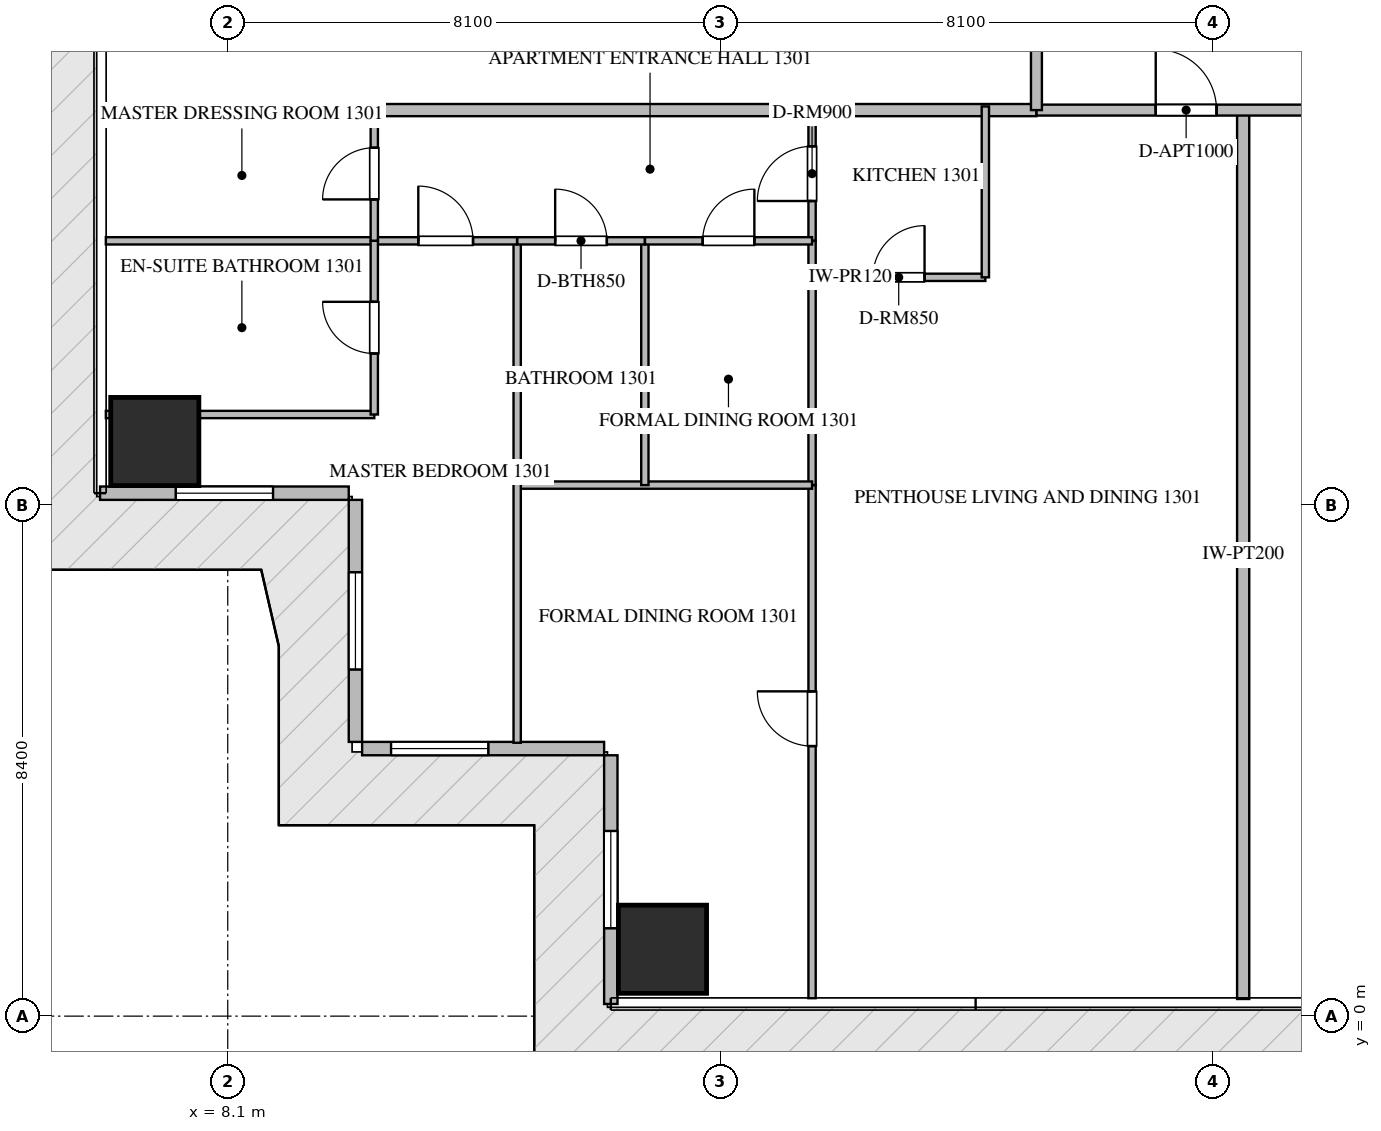
"""IFC4 building model, lengths in metres.
Left out: names, types, materials, properties, quantities, classifications, styles, units other than length and angle.
Written with IfcOpenShell. Run it as: python <this file> out.ifc"""

import sys

from ifc_helpers import new_model, si_unit, direction, frame, frame_2d, origin, origin_2d, place, context, subcontext, project, spatial, rectangle, extrude, source, transform, mapped, element, fill, save


model = new_model("IFC4")
c1 = context("Model", 3, precision=1e-05, world=origin(), true_north=direction((0.0, 1.0)))
c2 = subcontext(c1, "Body", "Model", "MODEL_VIEW")
j1 = project(units=[si_unit("LENGTHUNIT", "METRE"), si_unit("PLANEANGLEUNIT", "RADIAN")], contexts=[c1])
p1 = place(None, origin())
s1 = spatial("IfcSite", under=j1, at=p1, CompositionType="ELEMENT")
p2 = place(p1, origin())
s2 = spatial("IfcBuilding", under=s1, at=p2, CompositionType="ELEMENT")
p3 = place(p2, frame((0.0, 0.0, 56.7)))
s3 = spatial("IfcBuildingStorey", under=s2, at=p3, CompositionType="ELEMENT", Elevation=56.7)
m1 = source(origin(), c2, "Body", "SweptSolid", [
    extrude(rectangle(XDim=1.45, YDim=1.45, at=origin_2d()), origin(), (0.0, 0.0, 1.0), 3.75),
])
for number, where, z_axis, x_axis in (
    (1, (15.25, 1.1, -0.26), (0.0, 0.0, 1.0), (1.0, 0.0, 0.0)),
    (2, (6.9, 9.45, -0.26), (0.0, 0.0, 1.0), (1.0, 0.0, 0.0)),
):
    element("IfcColumn", number, at=place(p3, frame(where, z_axis=z_axis, x_axis=x_axis)), inside=s3, PredefinedType="COLUMN", context=c2, shape_type="MappedRepresentation", body=[
        mapped(m1, transform((0.0, 0.0, 0.0), scale=1.0)),
    ])
p4 = place(p3, frame((6.0, 8.6, 0.0), z_axis=(0.0, 0.0, 1.0), x_axis=(1.0, 0.0, 0.0)))
e3 = element("IfcWall", 3, at=p4, inside=s3, PredefinedType="ELEMENTEDWALL", context=c2, shape_type="SweptSolid", body=[
    extrude(rectangle(XDim=4.09, YDim=0.22, at=frame_2d((2.045, 0.0))), origin(), (0.0, 0.0, 1.0), 3.475),
])
p5 = place(p4, frame((1.245, 0.0, 0.65)))
e4 = element("IfcOpeningElement", 4, at=p5, cuts=e3, PredefinedType="OPENING", context=c2, shape_type="SweptSolid", body=[
    extrude(rectangle(XDim=1.6, YDim=2.1, at=frame_2d((0.8, 1.05))), frame((0.0, 0.12, 0.0), z_axis=(0.0, -1.0, 0.0), x_axis=(1.0, 0.0, 0.0)), (0.0, 0.0, 1.0), 0.24),
])
p6 = place(p3, frame((10.2, 8.49, 0.0), z_axis=(0.0, 0.0, 1.0), x_axis=(0.0, -1.0, 0.0)))
e5 = element("IfcWall", 5, at=p6, inside=s3, PredefinedType="ELEMENTEDWALL", context=c2, shape_type="SweptSolid", body=[
    extrude(rectangle(XDim=3.98, YDim=0.22, at=frame_2d((1.99, 0.0))), origin(), (0.0, 0.0, 1.0), 3.475),
])
p7 = place(p6, frame((1.19, 0.0, 0.65)))
e6 = element("IfcOpeningElement", 6, at=p7, cuts=e5, PredefinedType="OPENING", context=c2, shape_type="SweptSolid", body=[
    extrude(rectangle(XDim=1.6, YDim=2.1, at=frame_2d((0.8, 1.05))), frame((0.0, 0.12, 0.0), z_axis=(0.0, -1.0, 0.0), x_axis=(1.0, 0.0, 0.0)), (0.0, 0.0, 1.0), 0.24),
])
p8 = place(p3, frame((10.31, 4.4, 0.0), z_axis=(0.0, 0.0, 1.0), x_axis=(1.0, 0.0, 0.0)))
e7 = element("IfcWall", 7, at=p8, inside=s3, PredefinedType="ELEMENTEDWALL", context=c2, shape_type="SweptSolid", body=[
    extrude(rectangle(XDim=3.98, YDim=0.22, at=frame_2d((1.99, 0.0))), origin(), (0.0, 0.0, 1.0), 3.475),
])
p9 = place(p8, frame((0.476, 0.0, 0.65)))
e8 = element("IfcOpeningElement", 8, at=p9, cuts=e7, PredefinedType="OPENING", context=c2, shape_type="SweptSolid", body=[
    extrude(rectangle(XDim=1.6, YDim=2.1, at=frame_2d((0.8, 1.05))), frame((0.0, 0.12, 0.0), z_axis=(0.0, -1.0, 0.0), x_axis=(1.0, 0.0, 0.0)), (0.0, 0.0, 1.0), 0.24),
])
p10 = place(p3, frame((14.4, 4.29, 0.0), z_axis=(0.0, 0.0, 1.0), x_axis=(0.0, -1.0, 0.0)))
e9 = element("IfcWall", 9, at=p10, inside=s3, PredefinedType="ELEMENTEDWALL", context=c2, shape_type="SweptSolid", body=[
    extrude(rectangle(XDim=4.09, YDim=0.22, at=frame_2d((2.045, 0.0))), origin(), (0.0, 0.0, 1.0), 3.475),
])
p11 = place(p10, frame((1.245, 0.0, 0.65)))
e10 = element("IfcOpeningElement", 10, at=p11, cuts=e9, PredefinedType="OPENING", context=c2, shape_type="SweptSolid", body=[
    extrude(rectangle(XDim=1.6, YDim=2.1, at=frame_2d((0.8, 1.05))), frame((0.0, 0.12, 0.0), z_axis=(0.0, -1.0, 0.0), x_axis=(1.0, 0.0, 0.0)), (0.0, 0.0, 1.0), 0.24),
])
p12 = place(p3, frame((24.8, 0.282, 0.0), z_axis=(0.0, 0.0, 1.0), x_axis=(0.0, 1.0, 0.0)))
e11 = element("IfcWall", 11, at=p12, inside=s3, PredefinedType="PARTITIONING", context=c2, shape_type="SweptSolid", body=[
    extrude(rectangle(XDim=14.618, YDim=0.2, at=frame_2d((7.309, 0.0))), origin(), (0.0, 0.0, 1.0), 3.49),
])
p13 = place(p3, frame((6.082, 14.9, 0.0), z_axis=(0.0, 0.0, 1.0), x_axis=(1.0, 0.0, 0.0)))
e12 = element("IfcWall", 12, at=p13, inside=s3, PredefinedType="PARTITIONING", context=c2, shape_type="SweptSolid", body=[
    extrude(rectangle(XDim=15.318, YDim=0.2, at=frame_2d((7.659, 0.0))), origin(), (0.0, 0.0, 1.0), 3.49),
])
p14 = place(p3, frame((21.402, 14.9, 0.0), z_axis=(0.0, 0.0, 1.0), x_axis=(1.0, 0.0, 0.0)))
e13 = element("IfcWall", 13, at=p14, inside=s3, PredefinedType="PARTITIONING", context=c2, shape_type="SweptSolid", body=[
    extrude(rectangle(XDim=21.996, YDim=0.18, at=frame_2d((10.998, 0.0))), origin(), (0.0, 0.0, 1.0), 3.49),
])
p15 = place(p14, frame((1.96, 0.0, 0.0)))
e14 = element("IfcOpeningElement", 14, at=p15, cuts=e13, PredefinedType="OPENING", context=c2, shape_type="SweptSolid", body=[
    extrude(rectangle(XDim=1.0, YDim=2.15, at=frame_2d((0.5, 1.075))), frame((0.0, 0.1, 0.0), z_axis=(0.0, -1.0, 0.0), x_axis=(1.0, 0.0, 0.0)), (0.0, 0.0, 1.0), 0.2),
])
p16 = place(p14, frame((5.249, 0.0, 0.0)))
e15 = element("IfcOpeningElement", 15, at=p16, cuts=e13, PredefinedType="OPENING", context=c2, shape_type="SweptSolid", body=[
    extrude(rectangle(XDim=1.0, YDim=2.15, at=frame_2d((0.5, 1.075))), frame((0.0, 0.1, 0.0), z_axis=(0.0, -1.0, 0.0), x_axis=(1.0, 0.0, 0.0)), (0.0, 0.0, 1.0), 0.2),
])
p17 = place(p14, frame((11.653, 0.0, 0.0)))
e16 = element("IfcOpeningElement", 16, at=p17, cuts=e13, PredefinedType="OPENING", context=c2, shape_type="SweptSolid", body=[
    extrude(rectangle(XDim=1.0, YDim=2.15, at=frame_2d((0.5, 1.075))), frame((0.0, 0.1, 0.0), z_axis=(0.0, -1.0, 0.0), x_axis=(1.0, 0.0, 0.0)), (0.0, 0.0, 1.0), 0.2),
])
p18 = place(p14, frame((18.896, 0.0, 0.0)))
e17 = element("IfcOpeningElement", 17, at=p18, cuts=e13, PredefinedType="OPENING", context=c2, shape_type="SweptSolid", body=[
    extrude(rectangle(XDim=1.0, YDim=2.15, at=frame_2d((0.5, 1.075))), frame((0.0, 0.1, 0.0), z_axis=(0.0, -1.0, 0.0), x_axis=(1.0, 0.0, 0.0)), (0.0, 0.0, 1.0), 0.2),
])
p19 = place(p3, frame((21.4, 14.9, 0.0), z_axis=(0.0, 0.0, 1.0), x_axis=(0.0, 1.0, 0.0)))
e18 = element("IfcWall", 18, at=p19, inside=s3, PredefinedType="PARTITIONING", context=c2, shape_type="SweptSolid", body=[
    extrude(rectangle(XDim=20.6, YDim=0.18, at=frame_2d((10.3, 0.0))), origin(), (0.0, 0.0, 1.0), 3.49),
])
p20 = place(p19, frame((1.96, 0.0, 0.0)))
e19 = element("IfcOpeningElement", 19, at=p20, cuts=e18, PredefinedType="OPENING", context=c2, shape_type="SweptSolid", body=[
    extrude(rectangle(XDim=1.0, YDim=2.15, at=frame_2d((0.5, 1.075))), frame((0.0, 0.1, 0.0), z_axis=(0.0, -1.0, 0.0), x_axis=(1.0, 0.0, 0.0)), (0.0, 0.0, 1.0), 0.2),
])
p21 = place(p3, frame((17.71, 12.15, 0.0), z_axis=(0.0, 0.0, 1.0), x_axis=(1.0, 0.0, 0.0)))
e20 = element("IfcWall", 20, at=p21, inside=s3, PredefinedType="PARTITIONING", context=c2, shape_type="SweptSolid", body=[
    extrude(rectangle(XDim=2.85, YDim=0.12, at=frame_2d((1.425, 0.0))), origin(), (0.0, 0.0, 1.0), 3.49),
])
p22 = place(p21, frame((1.0, 0.0, 0.0)))
e21 = element("IfcOpeningElement", 21, at=p22, cuts=e20, PredefinedType="OPENING", context=c2, shape_type="SweptSolid", body=[
    extrude(rectangle(XDim=0.85, YDim=2.1, at=frame_2d((0.425, 1.05))), frame((0.0, 0.07, 0.0), z_axis=(0.0, -1.0, 0.0), x_axis=(1.0, 0.0, 0.0)), (0.0, 0.0, 1.0), 0.14),
])
p23 = place(p3, frame((20.56, 12.15, 0.0), z_axis=(0.0, 0.0, 1.0), x_axis=(0.0, 1.0, 0.0)))
e22 = element("IfcWall", 22, at=p23, inside=s3, PredefinedType="PARTITIONING", context=c2, shape_type="SweptSolid", body=[
    extrude(rectangle(XDim=2.81, YDim=0.12, at=frame_2d((1.405, 0.0))), origin(), (0.0, 0.0, 1.0), 3.49),
])
p24 = place(p3, frame((17.71, 12.75, 0.0), z_axis=(0.0, 0.0, 1.0), x_axis=(0.0, 1.0, 0.0)))
e23 = element("IfcWall", 23, at=p24, inside=s3, PredefinedType="PARTITIONING", context=c2, shape_type="SweptSolid", body=[
    extrude(rectangle(XDim=2.21, YDim=0.12, at=frame_2d((1.105, 0.0))), origin(), (0.0, 0.0, 1.0), 3.49),
])
p25 = place(p24, frame((0.655, 0.0, 0.0)))
e24 = element("IfcOpeningElement", 24, at=p25, cuts=e23, PredefinedType="OPENING", context=c2, shape_type="SweptSolid", body=[
    extrude(rectangle(XDim=0.9, YDim=2.1, at=frame_2d((0.45, 1.05))), frame((0.0, 0.07, 0.0), z_axis=(0.0, -1.0, 0.0), x_axis=(1.0, 0.0, 0.0)), (0.0, 0.0, 1.0), 0.14),
])
p26 = place(p3, frame((17.71, 0.295, 0.0), z_axis=(0.0, 0.0, 1.0), x_axis=(0.0, 1.0, 0.0)))
e25 = element("IfcWall", 25, at=p26, inside=s3, PredefinedType="PARTITIONING", context=c2, shape_type="SweptSolid", body=[
    extrude(rectangle(XDim=8.438, YDim=0.12, at=frame_2d((4.219, 0.0))), origin(), (0.0, 0.0, 1.0), 3.49),
])
p27 = place(p26, frame((4.146, 0.0, 0.0)))
e26 = element("IfcOpeningElement", 26, at=p27, cuts=e25, PredefinedType="OPENING", context=c2, shape_type="SweptSolid", body=[
    extrude(rectangle(XDim=0.9, YDim=2.1, at=frame_2d((0.45, 1.05))), frame((0.0, 0.07, 0.0), z_axis=(0.0, -1.0, 0.0), x_axis=(1.0, 0.0, 0.0)), (0.0, 0.0, 1.0), 0.14),
])
p28 = place(p3, frame((17.71, 8.735, 0.0), z_axis=(0.0, 0.0, 1.0), x_axis=(0.0, 1.0, 0.0)))
e27 = element("IfcWall", 27, at=p28, inside=s3, PredefinedType="PARTITIONING", context=c2, shape_type="SweptSolid", body=[
    extrude(rectangle(XDim=4.013, YDim=0.12, at=frame_2d((2.006, 0.0))), origin(), (0.0, 0.0, 1.0), 3.49),
])
p29 = place(p3, frame((12.86, 8.733, 0.0), z_axis=(0.0, 0.0, 1.0), x_axis=(1.0, 0.0, 0.0)))
e28 = element("IfcWall", 28, at=p29, inside=s3, PredefinedType="PARTITIONING", context=c2, shape_type="SweptSolid", body=[
    extrude(rectangle(XDim=4.85, YDim=0.12, at=frame_2d((2.425, 0.0))), origin(), (0.0, 0.0, 1.0), 3.49),
])
p30 = place(p3, frame((12.86, 4.495, 0.0), z_axis=(0.0, 0.0, 1.0), x_axis=(0.0, 1.0, 0.0)))
e29 = element("IfcWall", 29, at=p30, inside=s3, PredefinedType="PARTITIONING", context=c2, shape_type="SweptSolid", body=[
    extrude(rectangle(XDim=8.255, YDim=0.12, at=frame_2d((4.127, 0.0))), origin(), (0.0, 0.0, 1.0), 3.49),
])
p31 = place(p3, frame((14.96, 8.733, 0.0), z_axis=(0.0, 0.0, 1.0), x_axis=(0.0, 1.0, 0.0)))
e30 = element("IfcWall", 30, at=p31, inside=s3, PredefinedType="PARTITIONING", context=c2, shape_type="SweptSolid", body=[
    extrude(rectangle(XDim=4.017, YDim=0.12, at=frame_2d((2.009, 0.0))), origin(), (0.0, 0.0, 1.0), 3.49),
])
p32 = place(p3, frame((12.86, 12.75, 0.0), z_axis=(0.0, 0.0, 1.0), x_axis=(1.0, 0.0, 0.0)))
e31 = element("IfcWall", 31, at=p32, inside=s3, PredefinedType="PARTITIONING", context=c2, shape_type="SweptSolid", body=[
    extrude(rectangle(XDim=2.1, YDim=0.12, at=frame_2d((1.05, 0.0))), origin(), (0.0, 0.0, 1.0), 3.49),
])
p33 = place(p32, frame((0.625, 0.0, 0.0)))
e32 = element("IfcOpeningElement", 32, at=p33, cuts=e31, PredefinedType="OPENING", context=c2, shape_type="SweptSolid", body=[
    extrude(rectangle(XDim=0.85, YDim=2.1, at=frame_2d((0.425, 1.05))), frame((0.0, 0.07, 0.0), z_axis=(0.0, -1.0, 0.0), x_axis=(1.0, 0.0, 0.0)), (0.0, 0.0, 1.0), 0.14),
])
p34 = place(p3, frame((14.962, 12.75, 0.0), z_axis=(0.0, 0.0, 1.0), x_axis=(1.0, 0.0, 0.0)))
e33 = element("IfcWall", 33, at=p34, inside=s3, PredefinedType="PARTITIONING", context=c2, shape_type="SweptSolid", body=[
    extrude(rectangle(XDim=2.748, YDim=0.12, at=frame_2d((1.374, 0.0))), origin(), (0.0, 0.0, 1.0), 3.49),
])
p35 = place(p34, frame((0.949, 0.0, 0.0)))
e34 = element("IfcOpeningElement", 34, at=p35, cuts=e33, PredefinedType="OPENING", context=c2, shape_type="SweptSolid", body=[
    extrude(rectangle(XDim=0.85, YDim=2.1, at=frame_2d((0.425, 1.05))), frame((0.0, 0.07, 0.0), z_axis=(0.0, -1.0, 0.0), x_axis=(1.0, 0.0, 0.0)), (0.0, 0.0, 1.0), 0.14),
])
p36 = place(p3, frame((10.51, 12.75, 0.0), z_axis=(0.0, 0.0, 1.0), x_axis=(1.0, 0.0, 0.0)))
e35 = element("IfcWall", 35, at=p36, inside=s3, PredefinedType="PARTITIONING", context=c2, shape_type="SweptSolid", body=[
    extrude(rectangle(XDim=2.348, YDim=0.12, at=frame_2d((1.174, 0.0))), origin(), (0.0, 0.0, 1.0), 3.49),
])
p37 = place(p36, frame((0.724, 0.0, 0.0)))
e36 = element("IfcOpeningElement", 36, at=p37, cuts=e35, PredefinedType="OPENING", context=c2, shape_type="SweptSolid", body=[
    extrude(rectangle(XDim=0.9, YDim=2.1, at=frame_2d((0.45, 1.05))), frame((0.0, 0.07, 0.0), z_axis=(0.0, -1.0, 0.0), x_axis=(1.0, 0.0, 0.0)), (0.0, 0.0, 1.0), 0.14),
])
p38 = place(p3, frame((6.095, 9.894, 0.0), z_axis=(0.0, 0.0, 1.0), x_axis=(1.0, 0.0, 0.0)))
e37 = element("IfcWall", 37, at=p38, inside=s3, PredefinedType="PARTITIONING", context=c2, shape_type="SweptSolid", body=[
    extrude(rectangle(XDim=4.415, YDim=0.12, at=frame_2d((2.208, 0.0))), origin(), (0.0, 0.0, 1.0), 3.49),
])
p39 = place(p3, frame((6.095, 12.75, 0.0), z_axis=(0.0, 0.0, 1.0), x_axis=(1.0, 0.0, 0.0)))
e38 = element("IfcWall", 38, at=p39, inside=s3, PredefinedType="PARTITIONING", context=c2, shape_type="SweptSolid", body=[
    extrude(rectangle(XDim=4.413, YDim=0.12, at=frame_2d((2.207, 0.0))), origin(), (0.0, 0.0, 1.0), 3.49),
])
p40 = place(p3, frame((10.51, 9.894, 0.0), z_axis=(0.0, 0.0, 1.0), x_axis=(0.0, 1.0, 0.0)))
e39 = element("IfcWall", 39, at=p40, inside=s3, PredefinedType="PARTITIONING", context=c2, shape_type="SweptSolid", body=[
    extrude(rectangle(XDim=2.856, YDim=0.12, at=frame_2d((1.428, 0.0))), origin(), (0.0, 0.0, 1.0), 3.49),
])
p41 = place(p40, frame((1.003, 0.0, 0.0)))
e40 = element("IfcOpeningElement", 40, at=p41, cuts=e39, PredefinedType="OPENING", context=c2, shape_type="SweptSolid", body=[
    extrude(rectangle(XDim=0.85, YDim=2.1, at=frame_2d((0.425, 1.05))), frame((0.0, 0.07, 0.0), z_axis=(0.0, -1.0, 0.0), x_axis=(1.0, 0.0, 0.0)), (0.0, 0.0, 1.0), 0.14),
])
p42 = place(p3, frame((10.51, 12.752, 0.0), z_axis=(0.0, 0.0, 1.0), x_axis=(0.0, 1.0, 0.0)))
e41 = element("IfcWall", 41, at=p42, inside=s3, PredefinedType="PARTITIONING", context=c2, shape_type="SweptSolid", body=[
    extrude(rectangle(XDim=2.208, YDim=0.12, at=frame_2d((1.104, 0.0))), origin(), (0.0, 0.0, 1.0), 3.49),
])
p43 = place(p42, frame((0.679, 0.0, 0.0)))
e42 = element("IfcOpeningElement", 42, at=p43, cuts=e41, PredefinedType="OPENING", context=c2, shape_type="SweptSolid", body=[
    extrude(rectangle(XDim=0.85, YDim=2.1, at=frame_2d((0.425, 1.05))), frame((0.0, 0.07, 0.0), z_axis=(0.0, -1.0, 0.0), x_axis=(1.0, 0.0, 0.0)), (0.0, 0.0, 1.0), 0.14),
])
m2 = source(origin(), c2, "Body", "SweptSolid", [
    extrude(rectangle(XDim=1.6, YDim=2.1, at=frame_2d((0.8, 1.05))), frame((0.0, 0.03, 0.0), z_axis=(0.0, -1.0, 0.0), x_axis=(1.0, 0.0, 0.0)), (0.0, 0.0, 1.0), 0.06),
])
p44 = place(p5, origin())
e43 = element("IfcWindow", 43, at=p44, inside=s3, PartitioningType="SINGLE_PANEL", PredefinedType="WINDOW", context=c2, shape_type="MappedRepresentation", body=[
    mapped(m2, transform((0.0, 0.0, 0.0), scale=1.0)),
])
fill(e4, e43)
p45 = place(p7, origin())
e44 = element("IfcWindow", 44, at=p45, inside=s3, PartitioningType="SINGLE_PANEL", PredefinedType="WINDOW", context=c2, shape_type="MappedRepresentation", body=[
    mapped(m2, transform((0.0, 0.0, 0.0), scale=1.0)),
])
fill(e6, e44)
p46 = place(p9, origin())
e45 = element("IfcWindow", 45, at=p46, inside=s3, PartitioningType="SINGLE_PANEL", PredefinedType="WINDOW", context=c2, shape_type="MappedRepresentation", body=[
    mapped(m2, transform((0.0, 0.0, 0.0), scale=1.0)),
])
fill(e8, e45)
p47 = place(p11, origin())
e46 = element("IfcWindow", 46, at=p47, inside=s3, PartitioningType="SINGLE_PANEL", PredefinedType="WINDOW", context=c2, shape_type="MappedRepresentation", body=[
    mapped(m2, transform((0.0, 0.0, 0.0), scale=1.0)),
])
fill(e10, e46)
m3 = source(origin(), c2, "Body", "SweptSolid", [
    extrude(rectangle(XDim=1.0, YDim=2.15, at=frame_2d((0.5, 1.075))), frame((0.0, 0.025, 0.0), z_axis=(0.0, -1.0, 0.0), x_axis=(1.0, 0.0, 0.0)), (0.0, 0.0, 1.0), 0.05),
])
p48 = place(p15, origin())
e47 = element("IfcDoor", 47, at=p48, inside=s3, OperationType="SINGLE_SWING_LEFT", PredefinedType="DOOR", context=c2, shape_type="MappedRepresentation", body=[
    mapped(m3, transform((0.0, 0.0, 0.0), scale=1.0)),
])
fill(e14, e47)
m4 = source(origin(), c2, "Body", "SweptSolid", [
    extrude(rectangle(XDim=0.85, YDim=2.1, at=frame_2d((0.425, 1.05))), frame((0.0, 0.025, 0.0), z_axis=(0.0, -1.0, 0.0), x_axis=(1.0, 0.0, 0.0)), (0.0, 0.0, 1.0), 0.05),
])
p49 = place(p22, origin())
e48 = element("IfcDoor", 48, at=p49, inside=s3, OperationType="SINGLE_SWING_RIGHT", PredefinedType="DOOR", context=c2, shape_type="MappedRepresentation", body=[
    mapped(m4, transform((0.0, 0.0, 0.0), scale=1.0)),
])
fill(e21, e48)
m5 = source(origin(), c2, "Body", "SweptSolid", [
    extrude(rectangle(XDim=0.9, YDim=2.1, at=frame_2d((0.45, 1.05))), frame((0.0, 0.025, 0.0), z_axis=(0.0, -1.0, 0.0), x_axis=(1.0, 0.0, 0.0)), (0.0, 0.0, 1.0), 0.05),
])
p50 = place(p25, origin())
e49 = element("IfcDoor", 49, at=p50, inside=s3, OperationType="SINGLE_SWING_LEFT", PredefinedType="DOOR", context=c2, shape_type="MappedRepresentation", body=[
    mapped(m5, transform((0.0, 0.0, 0.0), scale=1.0)),
])
fill(e24, e49)
p51 = place(p27, origin())
e50 = element("IfcDoor", 50, at=p51, inside=s3, OperationType="SINGLE_SWING_RIGHT", PredefinedType="DOOR", context=c2, shape_type="MappedRepresentation", body=[
    mapped(m5, transform((0.0, 0.0, 0.0), scale=1.0)),
])
fill(e26, e50)
p52 = place(p33, origin())
e51 = element("IfcDoor", 51, at=p52, inside=s3, OperationType="SINGLE_SWING_LEFT", PredefinedType="DOOR", context=c2, shape_type="MappedRepresentation", body=[
    mapped(m4, transform((0.0, 0.0, 0.0), scale=1.0)),
])
fill(e32, e51)
p53 = place(p35, origin())
e52 = element("IfcDoor", 52, at=p53, inside=s3, OperationType="SINGLE_SWING_RIGHT", PredefinedType="DOOR", context=c2, shape_type="MappedRepresentation", body=[
    mapped(m4, transform((0.0, 0.0, 0.0), scale=1.0)),
])
fill(e34, e52)
p54 = place(p37, origin())
e53 = element("IfcDoor", 53, at=p54, inside=s3, OperationType="SINGLE_SWING_LEFT", PredefinedType="DOOR", context=c2, shape_type="MappedRepresentation", body=[
    mapped(m5, transform((0.0, 0.0, 0.0), scale=1.0)),
])
fill(e36, e53)
p55 = place(p41, origin())
e54 = element("IfcDoor", 54, at=p55, inside=s3, OperationType="SINGLE_SWING_RIGHT", PredefinedType="DOOR", context=c2, shape_type="MappedRepresentation", body=[
    mapped(m4, transform((0.0, 0.0, 0.0), scale=1.0)),
])
fill(e40, e54)
p56 = place(p43, origin())
e55 = element("IfcDoor", 55, at=p56, inside=s3, OperationType="SINGLE_SWING_LEFT", PredefinedType="DOOR", context=c2, shape_type="MappedRepresentation", body=[
    mapped(m4, transform((0.0, 0.0, 0.0), scale=1.0)),
])
fill(e42, e55)
save(model, sys.argv[1])
